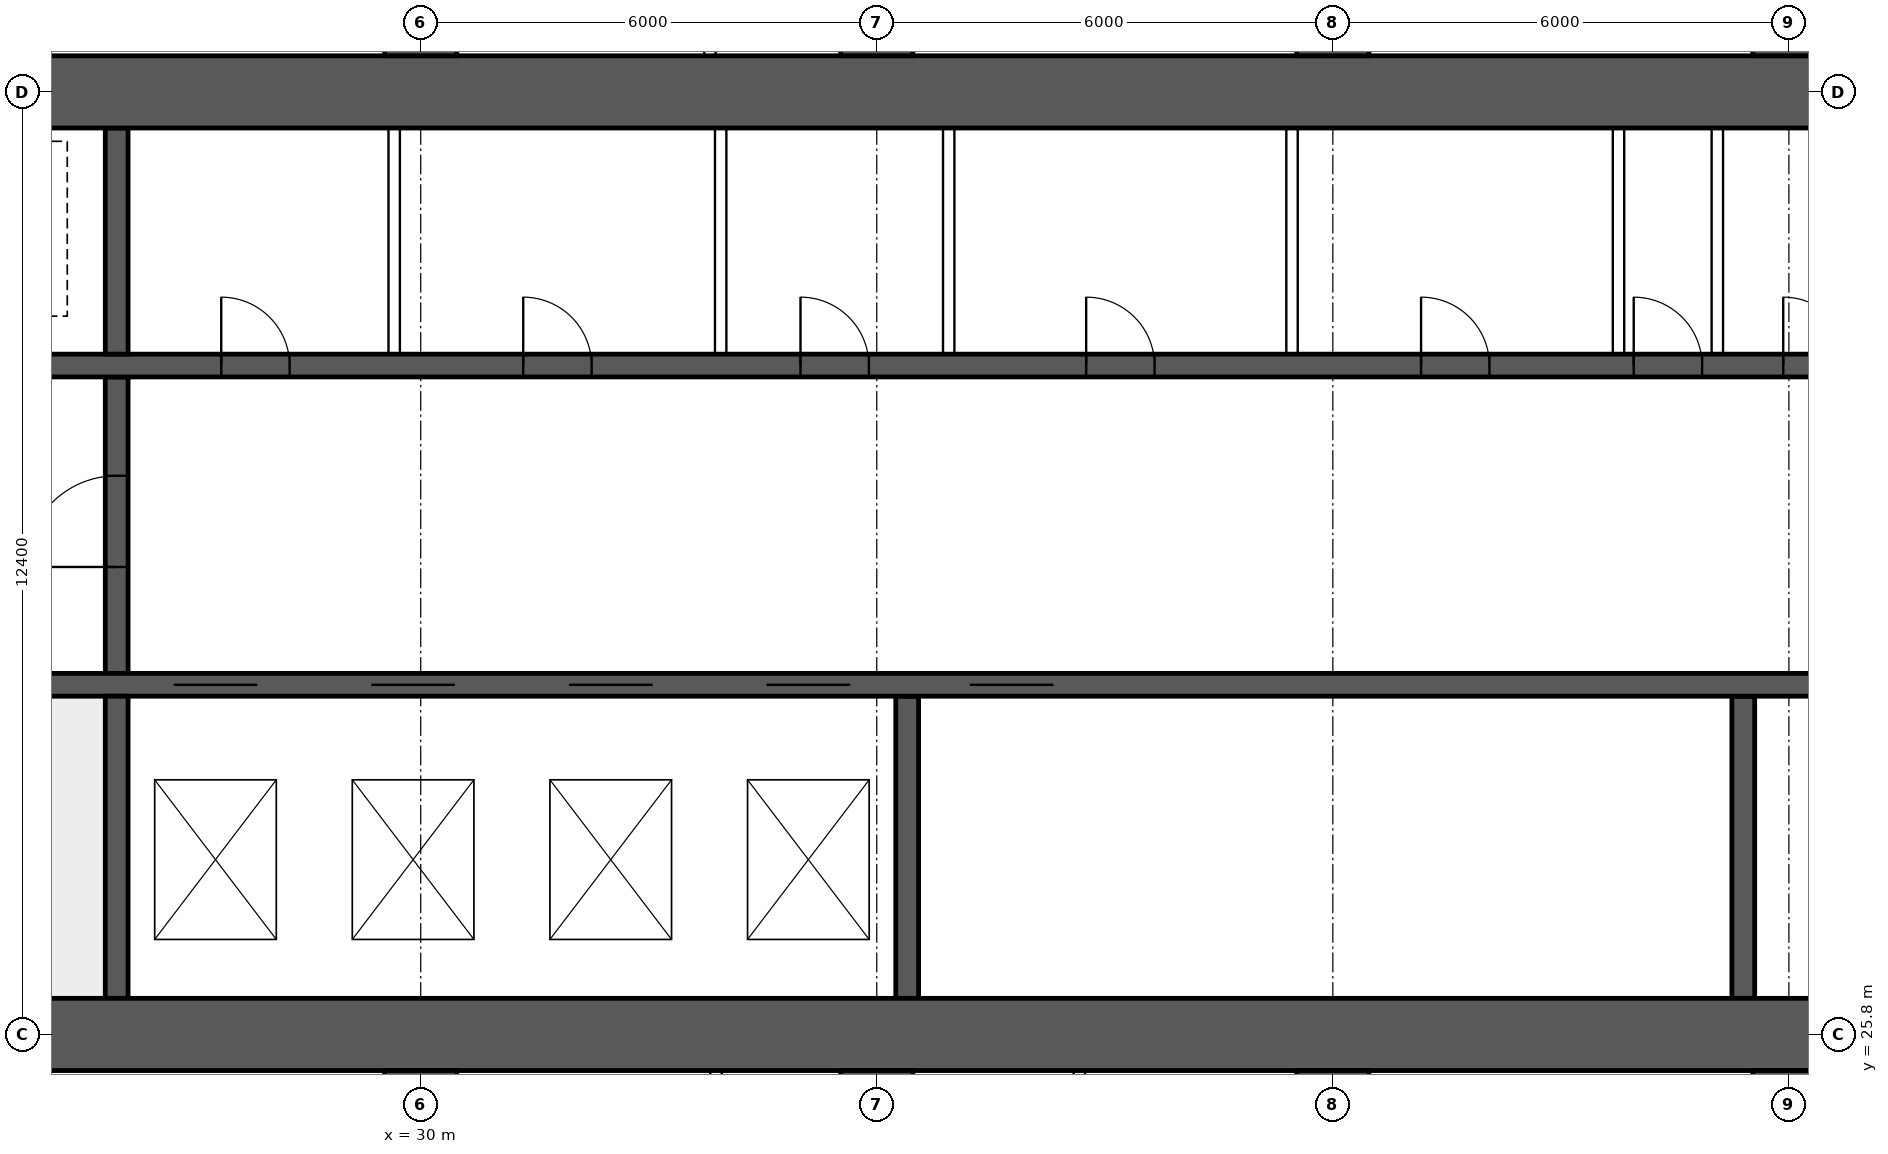
"""IFC4 building model, lengths in metres.
Left out: names, types, materials, properties, quantities, classifications, styles, units other than length and angle.
Written with IfcOpenShell. Run it as: python <this file> out.ifc"""

import sys

from ifc_helpers import new_model, si_unit, direction, frame, frame_2d, origin, place, context, subcontext, project, spatial, rectangle, extrude, element, fill, save


model = new_model("IFC4")
c1 = context("Model", 3, precision=1e-05, world=origin(), true_north=direction((0.0, 1.0)))
c2 = subcontext(c1, "Body", "Model", "MODEL_VIEW")
j1 = project(units=[si_unit("LENGTHUNIT", "METRE"), si_unit("PLANEANGLEUNIT", "RADIAN")], contexts=[c1])
p1 = place(None, origin())
s1 = spatial("IfcSite", under=j1, at=p1, CompositionType="ELEMENT")
p2 = place(p1, origin())
s2 = spatial("IfcBuilding", under=s1, at=p2, CompositionType="ELEMENT")
p3 = place(p2, frame((0.0, 0.0, 76.15)))
s3 = spatial("IfcBuildingStorey", under=s2, at=p3, CompositionType="ELEMENT", Elevation=76.15)
for number, where, z_axis, x_axis in (
    (1, (18.0, 25.8, 0.0), (0.0, 0.0, 1.0), (1.0, 0.0, 0.0)),
    (2, (18.0, 38.2, 0.0), (0.0, 0.0, 1.0), (1.0, 0.0, 0.0)),
):
    element("IfcWall", number, at=place(p3, frame(where, z_axis=z_axis, x_axis=x_axis)), inside=s3, PredefinedType="SHEAR", context=c2, shape_type="SweptSolid", body=[
        extrude(rectangle(XDim=48.0, YDim=0.95, at=frame_2d((24.0, 0.0))), origin(), (0.0, 0.0, 1.0), 4.5),
    ])
p4 = place(p3, frame((18.475, 30.4, 0.0), z_axis=(0.0, 0.0, 1.0), x_axis=(1.0, 0.0, 0.0)))
e3 = element("IfcWall", 3, at=p4, inside=s3, PredefinedType="SHEAR", context=c2, shape_type="SweptSolid", body=[
    extrude(rectangle(XDim=47.05, YDim=0.3, at=frame_2d((23.525, 0.0))), origin(), (0.0, 0.0, 1.0), 4.5),
])
p5 = place(p4, frame((0.4, 0.0, 0.0)))
e4 = element("IfcOpeningElement", 4, at=p5, cuts=e3, PredefinedType="OPENING", context=c2, shape_type="SweptSolid", body=[
    extrude(rectangle(XDim=1.0, YDim=2.1, at=frame_2d((0.5, 1.05))), frame((0.0, 0.16, 0.0), z_axis=(0.0, -1.0, 0.0), x_axis=(1.0, 0.0, 0.0)), (0.0, 0.0, 1.0), 0.32),
])
p6 = place(p4, frame((45.65, 0.0, 0.0)))
e5 = element("IfcOpeningElement", 5, at=p6, cuts=e3, PredefinedType="OPENING", context=c2, shape_type="SweptSolid", body=[
    extrude(rectangle(XDim=1.0, YDim=2.1, at=frame_2d((0.5, 1.05))), frame((0.0, 0.16, 0.0), z_axis=(0.0, -1.0, 0.0), x_axis=(1.0, 0.0, 0.0)), (0.0, 0.0, 1.0), 0.32),
])
p7 = place(p4, frame((8.275, 0.0, 0.0)))
e6 = element("IfcOpeningElement", 6, at=p7, cuts=e3, PredefinedType="OPENING", context=c2, shape_type="SweptSolid", body=[
    extrude(rectangle(XDim=1.1, YDim=2.1, at=frame_2d((0.55, 1.05))), frame((0.0, 0.16, 0.0), z_axis=(0.0, -1.0, 0.0), x_axis=(1.0, 0.0, 0.0)), (0.0, 0.0, 1.0), 0.32),
])
p8 = place(p4, frame((10.875, 0.0, 0.0)))
e7 = element("IfcOpeningElement", 7, at=p8, cuts=e3, PredefinedType="OPENING", context=c2, shape_type="SweptSolid", body=[
    extrude(rectangle(XDim=1.1, YDim=2.1, at=frame_2d((0.55, 1.05))), frame((0.0, 0.16, 0.0), z_axis=(0.0, -1.0, 0.0), x_axis=(1.0, 0.0, 0.0)), (0.0, 0.0, 1.0), 0.32),
])
p9 = place(p4, frame((13.475, 0.0, 0.0)))
e8 = element("IfcOpeningElement", 8, at=p9, cuts=e3, PredefinedType="OPENING", context=c2, shape_type="SweptSolid", body=[
    extrude(rectangle(XDim=1.1, YDim=2.1, at=frame_2d((0.55, 1.05))), frame((0.0, 0.16, 0.0), z_axis=(0.0, -1.0, 0.0), x_axis=(1.0, 0.0, 0.0)), (0.0, 0.0, 1.0), 0.32),
])
p10 = place(p4, frame((16.075, 0.0, 0.0)))
e9 = element("IfcOpeningElement", 9, at=p10, cuts=e3, PredefinedType="OPENING", context=c2, shape_type="SweptSolid", body=[
    extrude(rectangle(XDim=1.1, YDim=2.1, at=frame_2d((0.55, 1.05))), frame((0.0, 0.16, 0.0), z_axis=(0.0, -1.0, 0.0), x_axis=(1.0, 0.0, 0.0)), (0.0, 0.0, 1.0), 0.32),
])
p11 = place(p4, frame((18.75, 0.0, 0.0)))
e10 = element("IfcOpeningElement", 10, at=p11, cuts=e3, PredefinedType="OPENING", context=c2, shape_type="SweptSolid", body=[
    extrude(rectangle(XDim=1.1, YDim=2.1, at=frame_2d((0.55, 1.05))), frame((0.0, 0.16, 0.0), z_axis=(0.0, -1.0, 0.0), x_axis=(1.0, 0.0, 0.0)), (0.0, 0.0, 1.0), 0.32),
])
p12 = place(p4, frame((30.142, 0.0, 0.0)))
e11 = element("IfcOpeningElement", 11, at=p12, cuts=e3, PredefinedType="OPENING", context=c2, shape_type="SweptSolid", body=[
    extrude(rectangle(XDim=1.1, YDim=2.1, at=frame_2d((0.55, 1.05))), frame((0.0, 0.16, 0.0), z_axis=(0.0, -1.0, 0.0), x_axis=(1.0, 0.0, 0.0)), (0.0, 0.0, 1.0), 0.32),
])
p13 = place(p4, frame((33.675, 0.0, 0.0)))
e12 = element("IfcOpeningElement", 12, at=p13, cuts=e3, PredefinedType="OPENING", context=c2, shape_type="SweptSolid", body=[
    extrude(rectangle(XDim=1.1, YDim=2.1, at=frame_2d((0.55, 1.05))), frame((0.0, 0.16, 0.0), z_axis=(0.0, -1.0, 0.0), x_axis=(1.0, 0.0, 0.0)), (0.0, 0.0, 1.0), 0.32),
])
p14 = place(p4, frame((37.208, 0.0, 0.0)))
e13 = element("IfcOpeningElement", 13, at=p14, cuts=e3, PredefinedType="OPENING", context=c2, shape_type="SweptSolid", body=[
    extrude(rectangle(XDim=1.1, YDim=2.1, at=frame_2d((0.55, 1.05))), frame((0.0, 0.16, 0.0), z_axis=(0.0, -1.0, 0.0), x_axis=(1.0, 0.0, 0.0)), (0.0, 0.0, 1.0), 0.32),
])
p15 = place(p3, frame((18.475, 34.6, 0.0), z_axis=(0.0, 0.0, 1.0), x_axis=(1.0, 0.0, 0.0)))
e14 = element("IfcWall", 14, at=p15, inside=s3, PredefinedType="SHEAR", context=c2, shape_type="SweptSolid", body=[
    extrude(rectangle(XDim=47.05, YDim=0.3, at=frame_2d((23.525, 0.0))), origin(), (0.0, 0.0, 1.0), 4.5),
])
p16 = place(p15, frame((0.9, 0.0, 0.0)))
e15 = element("IfcOpeningElement", 15, at=p16, cuts=e14, PredefinedType="OPENING", context=c2, shape_type="SweptSolid", body=[
    extrude(rectangle(XDim=1.1, YDim=2.1, at=frame_2d((0.55, 1.05))), frame((0.0, 0.16, 0.0), z_axis=(0.0, -1.0, 0.0), x_axis=(1.0, 0.0, 0.0)), (0.0, 0.0, 1.0), 0.32),
])
p17 = place(p15, frame((45.05, 0.0, 0.0)))
e16 = element("IfcOpeningElement", 16, at=p17, cuts=e14, PredefinedType="OPENING", context=c2, shape_type="SweptSolid", body=[
    extrude(rectangle(XDim=1.1, YDim=2.1, at=frame_2d((0.55, 1.05))), frame((0.0, 0.16, 0.0), z_axis=(0.0, -1.0, 0.0), x_axis=(1.0, 0.0, 0.0)), (0.0, 0.0, 1.0), 0.32),
])
p18 = place(p15, frame((4.125, 0.0, 0.0)))
e17 = element("IfcOpeningElement", 17, at=p18, cuts=e14, PredefinedType="OPENING", context=c2, shape_type="SweptSolid", body=[
    extrude(rectangle(XDim=0.9, YDim=2.1, at=frame_2d((0.45, 1.05))), frame((0.0, 0.16, 0.0), z_axis=(0.0, -1.0, 0.0), x_axis=(1.0, 0.0, 0.0)), (0.0, 0.0, 1.0), 0.32),
])
p19 = place(p15, frame((42.025, 0.0, 0.0)))
e18 = element("IfcOpeningElement", 18, at=p19, cuts=e14, PredefinedType="OPENING", context=c2, shape_type="SweptSolid", body=[
    extrude(rectangle(XDim=0.9, YDim=2.1, at=frame_2d((0.45, 1.05))), frame((0.0, 0.16, 0.0), z_axis=(0.0, -1.0, 0.0), x_axis=(1.0, 0.0, 0.0)), (0.0, 0.0, 1.0), 0.32),
])
p20 = place(p15, frame((8.9, 0.0, 0.0)))
e19 = element("IfcOpeningElement", 19, at=p20, cuts=e14, PredefinedType="OPENING", context=c2, shape_type="SweptSolid", body=[
    extrude(rectangle(XDim=0.9, YDim=2.1, at=frame_2d((0.45, 1.05))), frame((0.0, 0.16, 0.0), z_axis=(0.0, -1.0, 0.0), x_axis=(1.0, 0.0, 0.0)), (0.0, 0.0, 1.0), 0.32),
])
p21 = place(p15, frame((12.874, 0.0, 0.0)))
e20 = element("IfcOpeningElement", 20, at=p21, cuts=e14, PredefinedType="OPENING", context=c2, shape_type="SweptSolid", body=[
    extrude(rectangle(XDim=0.9, YDim=2.1, at=frame_2d((0.45, 1.05))), frame((0.0, 0.16, 0.0), z_axis=(0.0, -1.0, 0.0), x_axis=(1.0, 0.0, 0.0)), (0.0, 0.0, 1.0), 0.32),
])
p22 = place(p15, frame((16.521, 0.0, 0.0)))
e21 = element("IfcOpeningElement", 21, at=p22, cuts=e14, PredefinedType="OPENING", context=c2, shape_type="SweptSolid", body=[
    extrude(rectangle(XDim=0.9, YDim=2.1, at=frame_2d((0.45, 1.05))), frame((0.0, 0.16, 0.0), z_axis=(0.0, -1.0, 0.0), x_axis=(1.0, 0.0, 0.0)), (0.0, 0.0, 1.0), 0.32),
])
p23 = place(p15, frame((20.28, 0.0, 0.0)))
e22 = element("IfcOpeningElement", 22, at=p23, cuts=e14, PredefinedType="OPENING", context=c2, shape_type="SweptSolid", body=[
    extrude(rectangle(XDim=0.9, YDim=2.1, at=frame_2d((0.45, 1.05))), frame((0.0, 0.16, 0.0), z_axis=(0.0, -1.0, 0.0), x_axis=(1.0, 0.0, 0.0)), (0.0, 0.0, 1.0), 0.32),
])
p24 = place(p15, frame((24.686, 0.0, 0.0)))
e23 = element("IfcOpeningElement", 23, at=p24, cuts=e14, PredefinedType="OPENING", context=c2, shape_type="SweptSolid", body=[
    extrude(rectangle(XDim=0.9, YDim=2.1, at=frame_2d((0.45, 1.05))), frame((0.0, 0.16, 0.0), z_axis=(0.0, -1.0, 0.0), x_axis=(1.0, 0.0, 0.0)), (0.0, 0.0, 1.0), 0.32),
])
p25 = place(p15, frame((27.483, 0.0, 0.0)))
e24 = element("IfcOpeningElement", 24, at=p25, cuts=e14, PredefinedType="OPENING", context=c2, shape_type="SweptSolid", body=[
    extrude(rectangle(XDim=0.9, YDim=2.1, at=frame_2d((0.45, 1.05))), frame((0.0, 0.16, 0.0), z_axis=(0.0, -1.0, 0.0), x_axis=(1.0, 0.0, 0.0)), (0.0, 0.0, 1.0), 0.32),
])
p26 = place(p15, frame((29.45, 0.0, 0.0)))
e25 = element("IfcOpeningElement", 25, at=p26, cuts=e14, PredefinedType="OPENING", context=c2, shape_type="SweptSolid", body=[
    extrude(rectangle(XDim=0.9, YDim=2.1, at=frame_2d((0.45, 1.05))), frame((0.0, 0.16, 0.0), z_axis=(0.0, -1.0, 0.0), x_axis=(1.0, 0.0, 0.0)), (0.0, 0.0, 1.0), 0.32),
])
p27 = place(p15, frame((31.882, 0.0, 0.0)))
e26 = element("IfcOpeningElement", 26, at=p27, cuts=e14, PredefinedType="OPENING", context=c2, shape_type="SweptSolid", body=[
    extrude(rectangle(XDim=0.9, YDim=2.1, at=frame_2d((0.45, 1.05))), frame((0.0, 0.16, 0.0), z_axis=(0.0, -1.0, 0.0), x_axis=(1.0, 0.0, 0.0)), (0.0, 0.0, 1.0), 0.32),
])
p28 = place(p15, frame((34.617, 0.0, 0.0)))
e27 = element("IfcOpeningElement", 27, at=p28, cuts=e14, PredefinedType="OPENING", context=c2, shape_type="SweptSolid", body=[
    extrude(rectangle(XDim=0.9, YDim=2.1, at=frame_2d((0.45, 1.05))), frame((0.0, 0.16, 0.0), z_axis=(0.0, -1.0, 0.0), x_axis=(1.0, 0.0, 0.0)), (0.0, 0.0, 1.0), 0.32),
])
p29 = place(p15, frame((37.656, 0.0, 0.0)))
e28 = element("IfcOpeningElement", 28, at=p29, cuts=e14, PredefinedType="OPENING", context=c2, shape_type="SweptSolid", body=[
    extrude(rectangle(XDim=0.9, YDim=2.1, at=frame_2d((0.45, 1.05))), frame((0.0, 0.16, 0.0), z_axis=(0.0, -1.0, 0.0), x_axis=(1.0, 0.0, 0.0)), (0.0, 0.0, 1.0), 0.32),
])
p30 = place(p3, frame((26.0, 26.275, 0.0), z_axis=(0.0, 0.0, 1.0), x_axis=(0.0, 1.0, 0.0)))
e29 = element("IfcWall", 29, at=p30, inside=s3, PredefinedType="SHEAR", context=c2, shape_type="SweptSolid", body=[
    extrude(rectangle(XDim=3.975, YDim=0.3, at=frame_2d((1.988, 0.0))), origin(), (0.0, 0.0, 1.0), 4.5),
])
p31 = place(p3, frame((26.0, 30.55, 0.0), z_axis=(0.0, 0.0, 1.0), x_axis=(0.0, 1.0, 0.0)))
e30 = element("IfcWall", 30, at=p31, inside=s3, PredefinedType="SHEAR", context=c2, shape_type="SweptSolid", body=[
    extrude(rectangle(XDim=3.9, YDim=0.3, at=frame_2d((1.95, 0.0))), origin(), (0.0, 0.0, 1.0), 4.5),
])
p32 = place(p31, frame((1.4, 0.0, 0.0)))
e31 = element("IfcOpeningElement", 31, at=p32, cuts=e30, PredefinedType="OPENING", context=c2, shape_type="SweptSolid", body=[
    extrude(rectangle(XDim=1.2, YDim=2.1, at=frame_2d((0.6, 1.05))), frame((0.0, 0.16, 0.0), z_axis=(0.0, -1.0, 0.0), x_axis=(1.0, 0.0, 0.0)), (0.0, 0.0, 1.0), 0.32),
])
p33 = place(p3, frame((26.0, 34.75, 0.0), z_axis=(0.0, 0.0, 1.0), x_axis=(0.0, 1.0, 0.0)))
e32 = element("IfcWall", 32, at=p33, inside=s3, PredefinedType="SHEAR", context=c2, shape_type="SweptSolid", body=[
    extrude(rectangle(XDim=2.975, YDim=0.3, at=frame_2d((1.488, 0.0))), origin(), (0.0, 0.0, 1.0), 4.5),
])
for number, where, z_axis, x_axis in (
    (33, (36.4, 26.275, 0.0), (0.0, 0.0, 1.0), (0.0, 1.0, 0.0)),
    (34, (47.4, 26.275, 0.0), (0.0, 0.0, 1.0), (0.0, 1.0, 0.0)),
):
    element("IfcWall", number, at=place(p3, frame(where, z_axis=z_axis, x_axis=x_axis)), inside=s3, PredefinedType="SHEAR", context=c2, shape_type="SweptSolid", body=[
        extrude(rectangle(XDim=3.975, YDim=0.3, at=frame_2d((1.988, 0.0))), origin(), (0.0, 0.0, 1.0), 4.5),
    ])
for number, where, z_axis, x_axis in (
    (35, (30.0, 16.0, 0.0), (0.0, 0.0, 1.0), (0.0, 1.0, 0.0)),
    (36, (30.0, 38.675, 0.0), (0.0, 0.0, 1.0), (0.0, 1.0, 0.0)),
    (37, (36.0, 16.0, 0.0), (0.0, 0.0, 1.0), (0.0, 1.0, 0.0)),
    (38, (36.0, 38.675, 0.0), (0.0, 0.0, 1.0), (0.0, 1.0, 0.0)),
    (39, (42.0, 16.0, 0.0), (0.0, 0.0, 1.0), (0.0, 1.0, 0.0)),
    (40, (42.0, 38.675, 0.0), (0.0, 0.0, 1.0), (0.0, 1.0, 0.0)),
    (41, (48.0, 16.0, 0.0), (0.0, 0.0, 1.0), (0.0, 1.0, 0.0)),
    (42, (48.0, 38.675, 0.0), (0.0, 0.0, 1.0), (0.0, 1.0, 0.0)),
):
    element("IfcWall", number, at=place(p3, frame(where, z_axis=z_axis, x_axis=x_axis)), inside=s3, PredefinedType="SHEAR", context=c2, shape_type="SweptSolid", body=[
        extrude(rectangle(XDim=9.325, YDim=0.95, at=frame_2d((4.663, 0.0))), origin(), (0.0, 0.0, 1.0), 4.5),
    ])
for number, where, z_axis, x_axis in (
    (43, (29.651, 34.75, 0.0), (0.0, 0.0, 1.0), (0.0, 1.0, 0.0)),
    (44, (33.946, 34.75, 0.0), (0.0, 0.0, 1.0), (0.0, 1.0, 0.0)),
    (45, (36.946, 34.75, 0.0), (0.0, 0.0, 1.0), (0.0, 1.0, 0.0)),
    (46, (41.463, 34.75, 0.0), (0.0, 0.0, 1.0), (0.0, 1.0, 0.0)),
    (47, (45.758, 34.75, 0.0), (0.0, 0.0, 1.0), (0.0, 1.0, 0.0)),
    (48, (47.058, 34.75, 0.0), (0.0, 0.0, 1.0), (0.0, 1.0, 0.0)),
):
    element("IfcWall", number, at=place(p3, frame(where, z_axis=z_axis, x_axis=x_axis)), inside=s3, PredefinedType="SOLIDWALL", context=c2, shape_type="SweptSolid", body=[
        extrude(rectangle(XDim=2.975, YDim=0.15, at=frame_2d((1.488, 0.0))), origin(), (0.0, 0.0, 1.0), 4.25),
    ])
for number, where, z_axis, x_axis in (
    (49, (33.885, 16.1, 0.0), (0.0, 0.0, 1.0), (0.0, 1.0, 0.0)),
    (50, (38.665, 16.1, 0.0), (0.0, 0.0, 1.0), (0.0, 1.0, 0.0)),
    (51, (33.805, 38.675, 0.0), (0.0, 0.0, 1.0), (0.0, 1.0, 0.0)),
):
    element("IfcWall", number, at=place(p3, frame(where, z_axis=z_axis, x_axis=x_axis)), inside=s3, PredefinedType="PARTITIONING", context=c2, shape_type="SweptSolid", body=[
        extrude(rectangle(XDim=9.225, YDim=0.15, at=frame_2d((4.612, 0.0))), origin(), (0.0, 0.0, 1.0), 4.25),
    ])
p34 = place(p32, origin())
e52 = element("IfcDoor", 52, at=p34, inside=s3, OperationType="SINGLE_SWING_LEFT", PredefinedType="DOOR", context=c2, shape_type="SweptSolid", body=[
    extrude(rectangle(XDim=1.2, YDim=2.1, at=frame_2d((0.6, 1.05))), frame((0.0, 0.025, 0.0), z_axis=(0.0, -1.0, 0.0), x_axis=(1.0, 0.0, 0.0)), (0.0, 0.0, 1.0), 0.05),
])
fill(e31, e52)
p35 = place(p20, origin())
e53 = element("IfcDoor", 53, at=p35, inside=s3, OperationType="SINGLE_SWING_LEFT", PredefinedType="DOOR", context=c2, shape_type="SweptSolid", body=[
    extrude(rectangle(XDim=0.9, YDim=2.1, at=frame_2d((0.45, 1.05))), frame((0.0, 0.025, 0.0), z_axis=(0.0, -1.0, 0.0), x_axis=(1.0, 0.0, 0.0)), (0.0, 0.0, 1.0), 0.05),
])
fill(e19, e53)
p36 = place(p21, origin())
e54 = element("IfcDoor", 54, at=p36, inside=s3, OperationType="SINGLE_SWING_LEFT", PredefinedType="DOOR", context=c2, shape_type="SweptSolid", body=[
    extrude(rectangle(XDim=0.9, YDim=2.1, at=frame_2d((0.45, 1.05))), frame((0.0, 0.025, 0.0), z_axis=(0.0, -1.0, 0.0), x_axis=(1.0, 0.0, 0.0)), (0.0, 0.0, 1.0), 0.05),
])
fill(e20, e54)
p37 = place(p22, origin())
e55 = element("IfcDoor", 55, at=p37, inside=s3, OperationType="SINGLE_SWING_LEFT", PredefinedType="DOOR", context=c2, shape_type="SweptSolid", body=[
    extrude(rectangle(XDim=0.9, YDim=2.1, at=frame_2d((0.45, 1.05))), frame((0.0, 0.025, 0.0), z_axis=(0.0, -1.0, 0.0), x_axis=(1.0, 0.0, 0.0)), (0.0, 0.0, 1.0), 0.05),
])
fill(e21, e55)
p38 = place(p23, origin())
e56 = element("IfcDoor", 56, at=p38, inside=s3, OperationType="SINGLE_SWING_LEFT", PredefinedType="DOOR", context=c2, shape_type="SweptSolid", body=[
    extrude(rectangle(XDim=0.9, YDim=2.1, at=frame_2d((0.45, 1.05))), frame((0.0, 0.025, 0.0), z_axis=(0.0, -1.0, 0.0), x_axis=(1.0, 0.0, 0.0)), (0.0, 0.0, 1.0), 0.05),
])
fill(e22, e56)
p39 = place(p24, origin())
e57 = element("IfcDoor", 57, at=p39, inside=s3, OperationType="SINGLE_SWING_LEFT", PredefinedType="DOOR", context=c2, shape_type="SweptSolid", body=[
    extrude(rectangle(XDim=0.9, YDim=2.1, at=frame_2d((0.45, 1.05))), frame((0.0, 0.025, 0.0), z_axis=(0.0, -1.0, 0.0), x_axis=(1.0, 0.0, 0.0)), (0.0, 0.0, 1.0), 0.05),
])
fill(e23, e57)
p40 = place(p25, origin())
e58 = element("IfcDoor", 58, at=p40, inside=s3, OperationType="SINGLE_SWING_LEFT", PredefinedType="DOOR", context=c2, shape_type="SweptSolid", body=[
    extrude(rectangle(XDim=0.9, YDim=2.1, at=frame_2d((0.45, 1.05))), frame((0.0, 0.025, 0.0), z_axis=(0.0, -1.0, 0.0), x_axis=(1.0, 0.0, 0.0)), (0.0, 0.0, 1.0), 0.05),
])
fill(e24, e58)
p41 = place(p26, origin())
e59 = element("IfcDoor", 59, at=p41, inside=s3, OperationType="SINGLE_SWING_LEFT", PredefinedType="DOOR", context=c2, shape_type="SweptSolid", body=[
    extrude(rectangle(XDim=0.9, YDim=2.1, at=frame_2d((0.45, 1.05))), frame((0.0, 0.025, 0.0), z_axis=(0.0, -1.0, 0.0), x_axis=(1.0, 0.0, 0.0)), (0.0, 0.0, 1.0), 0.05),
])
fill(e25, e59)
p42 = place(p7, origin())
e60 = element("IfcDoor", 60, at=p42, inside=s3, OperationType="DOUBLE_DOOR_SLIDING", PredefinedType="DOOR", context=c2, shape_type="SweptSolid", body=[
    extrude(rectangle(XDim=1.1, YDim=2.1, at=frame_2d((0.55, 1.05))), frame((0.0, 0.025, 0.0), z_axis=(0.0, -1.0, 0.0), x_axis=(1.0, 0.0, 0.0)), (0.0, 0.0, 1.0), 0.05),
])
fill(e6, e60)
p43 = place(p8, origin())
e61 = element("IfcDoor", 61, at=p43, inside=s3, OperationType="DOUBLE_DOOR_SLIDING", PredefinedType="DOOR", context=c2, shape_type="SweptSolid", body=[
    extrude(rectangle(XDim=1.1, YDim=2.1, at=frame_2d((0.55, 1.05))), frame((0.0, 0.025, 0.0), z_axis=(0.0, -1.0, 0.0), x_axis=(1.0, 0.0, 0.0)), (0.0, 0.0, 1.0), 0.05),
])
fill(e7, e61)
p44 = place(p9, origin())
e62 = element("IfcDoor", 62, at=p44, inside=s3, OperationType="DOUBLE_DOOR_SLIDING", PredefinedType="DOOR", context=c2, shape_type="SweptSolid", body=[
    extrude(rectangle(XDim=1.1, YDim=2.1, at=frame_2d((0.55, 1.05))), frame((0.0, 0.025, 0.0), z_axis=(0.0, -1.0, 0.0), x_axis=(1.0, 0.0, 0.0)), (0.0, 0.0, 1.0), 0.05),
])
fill(e8, e62)
p45 = place(p10, origin())
e63 = element("IfcDoor", 63, at=p45, inside=s3, OperationType="DOUBLE_DOOR_SLIDING", PredefinedType="DOOR", context=c2, shape_type="SweptSolid", body=[
    extrude(rectangle(XDim=1.1, YDim=2.1, at=frame_2d((0.55, 1.05))), frame((0.0, 0.025, 0.0), z_axis=(0.0, -1.0, 0.0), x_axis=(1.0, 0.0, 0.0)), (0.0, 0.0, 1.0), 0.05),
])
fill(e9, e63)
p46 = place(p11, origin())
e64 = element("IfcDoor", 64, at=p46, inside=s3, OperationType="DOUBLE_DOOR_SLIDING", PredefinedType="DOOR", context=c2, shape_type="SweptSolid", body=[
    extrude(rectangle(XDim=1.1, YDim=2.1, at=frame_2d((0.55, 1.05))), frame((0.0, 0.025, 0.0), z_axis=(0.0, -1.0, 0.0), x_axis=(1.0, 0.0, 0.0)), (0.0, 0.0, 1.0), 0.05),
])
fill(e10, e64)
save(model, sys.argv[1])
